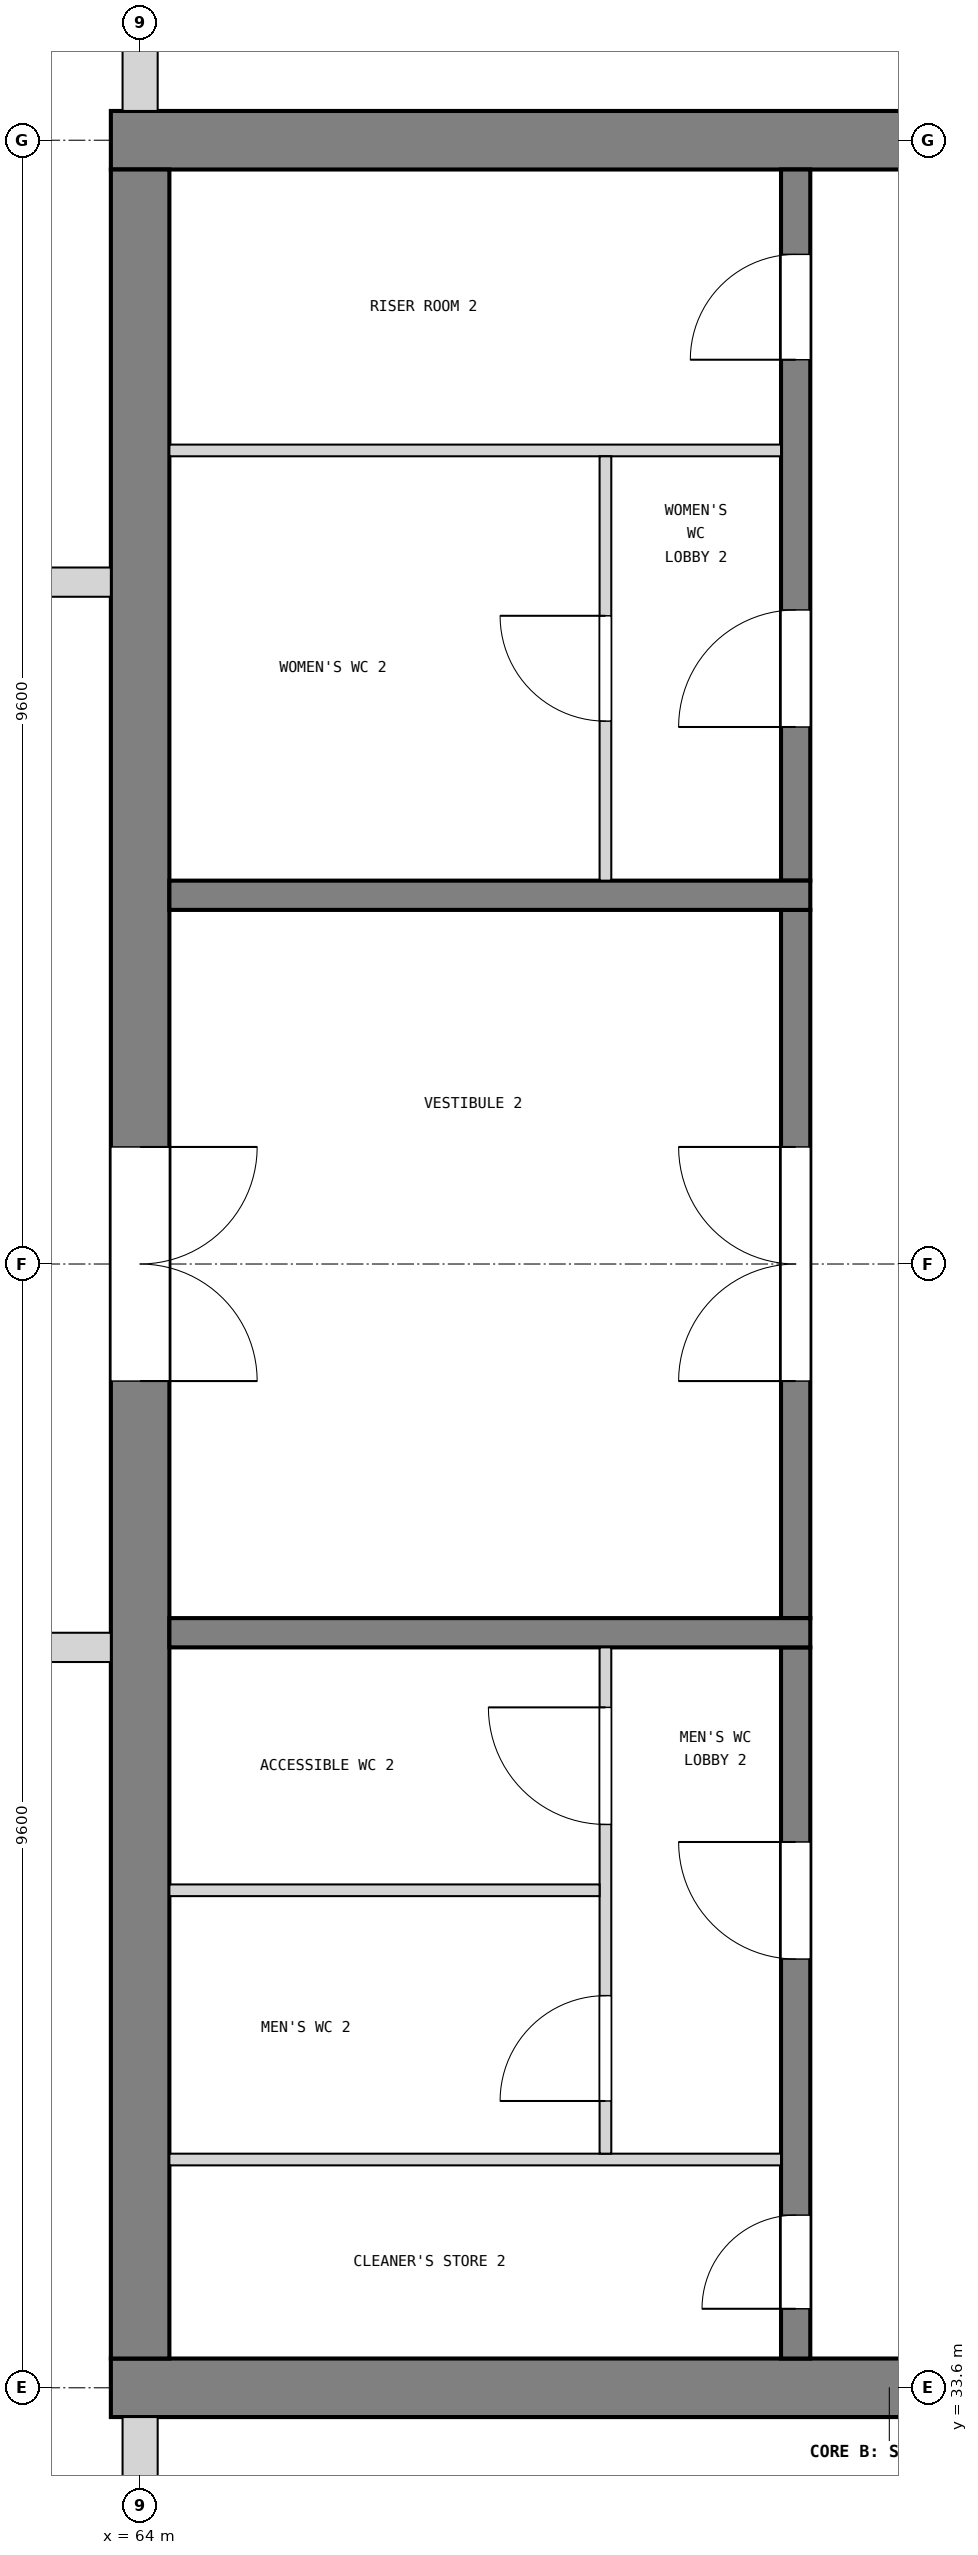
"""IFC4 building model, lengths in metres.
Left out: names, types, materials, properties, quantities, classifications, styles, units other than length and angle.
Written with IfcOpenShell. Run it as: python <this file> out.ifc"""

import sys

from ifc_helpers import new_model, si_unit, direction, frame, frame_2d, origin, place, context, subcontext, project, spatial, rectangle, extrude, element, fill, save


model = new_model("IFC4")
c1 = context("Model", 3, precision=1e-05, world=origin(), true_north=direction((0.0, 1.0)))
c2 = subcontext(c1, "Body", "Model", "MODEL_VIEW")
j1 = project(units=[si_unit("LENGTHUNIT", "METRE"), si_unit("PLANEANGLEUNIT", "RADIAN")], contexts=[c1])
p1 = place(None, origin())
s1 = spatial("IfcSite", under=j1, at=p1, CompositionType="ELEMENT")
p2 = place(p1, origin())
s2 = spatial("IfcBuilding", under=s1, at=p2, CompositionType="ELEMENT")
p3 = place(p2, frame((0.0, 0.0, 64.2)))
s3 = spatial("IfcBuildingStorey", under=s2, at=p3, CompositionType="ELEMENT", Elevation=64.2)
p4 = place(p3, frame((63.75, 52.8, 0.0), z_axis=(0.0, 0.0, 1.0), x_axis=(1.0, 0.0, 0.0)))
e1 = element("IfcWall", 1, at=p4, inside=s3, PredefinedType="SHEAR", context=c2, shape_type="SweptSolid", body=[
    extrude(rectangle(XDim=13.3, YDim=0.5, at=frame_2d((6.65, 0.0))), origin(), (0.0, 0.0, 1.0), 5.1),
])
p5 = place(p4, frame((11.05, 0.0, 1.0)))
e2 = element("IfcOpeningElement", 2, at=p5, cuts=e1, PredefinedType="OPENING", context=c2, shape_type="SweptSolid", body=[
    extrude(rectangle(XDim=0.4, YDim=2.0, at=frame_2d((0.2, 1.0))), frame((0.0, 0.26, 0.0), z_axis=(0.0, -1.0, 0.0), x_axis=(1.0, 0.0, 0.0)), (0.0, 0.0, 1.0), 0.52),
])
p6 = place(p3, frame((63.75, 33.6, 0.0), z_axis=(0.0, 0.0, 1.0), x_axis=(1.0, 0.0, 0.0)))
e3 = element("IfcWall", 3, at=p6, inside=s3, PredefinedType="SHEAR", context=c2, shape_type="SweptSolid", body=[
    extrude(rectangle(XDim=13.3, YDim=0.5, at=frame_2d((6.65, 0.0))), origin(), (0.0, 0.0, 1.0), 5.1),
])
p7 = place(p6, frame((11.05, 0.0, 1.0)))
e4 = element("IfcOpeningElement", 4, at=p7, cuts=e3, PredefinedType="OPENING", context=c2, shape_type="SweptSolid", body=[
    extrude(rectangle(XDim=0.4, YDim=2.0, at=frame_2d((0.2, 1.0))), frame((0.0, 0.26, 0.0), z_axis=(0.0, -1.0, 0.0), x_axis=(1.0, 0.0, 0.0)), (0.0, 0.0, 1.0), 0.52),
])
p8 = place(p3, frame((64.0, 33.85, 0.0), z_axis=(0.0, 0.0, 1.0), x_axis=(0.0, 1.0, 0.0)))
e5 = element("IfcWall", 5, at=p8, inside=s3, PredefinedType="SHEAR", context=c2, shape_type="SweptSolid", body=[
    extrude(rectangle(XDim=18.7, YDim=0.5, at=frame_2d((9.35, 0.0))), origin(), (0.0, 0.0, 1.0), 5.1),
])
p9 = place(p8, frame((8.35, 0.0, 0.0)))
e6 = element("IfcOpeningElement", 6, at=p9, cuts=e5, PredefinedType="OPENING", context=c2, shape_type="SweptSolid", body=[
    extrude(rectangle(XDim=2.0, YDim=2.1, at=frame_2d((1.0, 1.05))), frame((0.0, 0.26, 0.0), z_axis=(0.0, -1.0, 0.0), x_axis=(1.0, 0.0, 0.0)), (0.0, 0.0, 1.0), 0.52),
])
p10 = place(p3, frame((64.0, 31.0, 0.0), z_axis=(0.0, 0.0, 1.0), x_axis=(0.0, 1.0, 0.0)))
e7 = element("IfcWall", 7, at=p10, inside=s3, PredefinedType="SOLIDWALL", context=c2, shape_type="SweptSolid", body=[
    extrude(rectangle(XDim=2.35, YDim=0.3, at=frame_2d((1.175, 0.0))), origin(), (0.0, 0.0, 1.0), 4.3),
])
p11 = place(p3, frame((64.0, 53.05, 0.0), z_axis=(0.0, 0.0, 1.0), x_axis=(0.0, 1.0, 0.0)))
e8 = element("IfcWall", 8, at=p11, inside=s3, PredefinedType="SOLIDWALL", context=c2, shape_type="SweptSolid", body=[
    extrude(rectangle(XDim=2.35, YDim=0.3, at=frame_2d((1.175, 0.0))), origin(), (0.0, 0.0, 1.0), 4.3),
])
p12 = place(p3, frame((69.6, 33.85, 0.0), z_axis=(0.0, 0.0, 1.0), x_axis=(0.0, 1.0, 0.0)))
e9 = element("IfcWall", 9, at=p12, inside=s3, PredefinedType="SOLIDWALL", context=c2, shape_type="SweptSolid", body=[
    extrude(rectangle(XDim=6.075, YDim=0.25, at=frame_2d((3.038, 0.0))), origin(), (0.0, 0.0, 1.0), 5.1),
])
p13 = place(p12, frame((0.425, 0.0, 0.0)))
e10 = element("IfcOpeningElement", 10, at=p13, cuts=e9, PredefinedType="OPENING", context=c2, shape_type="SweptSolid", body=[
    extrude(rectangle(XDim=0.8, YDim=2.1, at=frame_2d((0.4, 1.05))), frame((0.0, 0.135, 0.0), z_axis=(0.0, -1.0, 0.0), x_axis=(1.0, 0.0, 0.0)), (0.0, 0.0, 1.0), 0.27),
])
p14 = place(p12, frame((3.413, 0.0, 0.0)))
e11 = element("IfcOpeningElement", 11, at=p14, cuts=e9, PredefinedType="OPENING", context=c2, shape_type="SweptSolid", body=[
    extrude(rectangle(XDim=1.0, YDim=2.1, at=frame_2d((0.5, 1.05))), frame((0.0, 0.135, 0.0), z_axis=(0.0, -1.0, 0.0), x_axis=(1.0, 0.0, 0.0)), (0.0, 0.0, 1.0), 0.27),
])
p15 = place(p3, frame((69.6, 40.175, 0.0), z_axis=(0.0, 0.0, 1.0), x_axis=(0.0, 1.0, 0.0)))
e12 = element("IfcWall", 12, at=p15, inside=s3, PredefinedType="SOLIDWALL", context=c2, shape_type="SweptSolid", body=[
    extrude(rectangle(XDim=6.05, YDim=0.25, at=frame_2d((3.025, 0.0))), origin(), (0.0, 0.0, 1.0), 5.1),
])
p16 = place(p15, frame((2.025, 0.0, 0.0)))
e13 = element("IfcOpeningElement", 13, at=p16, cuts=e12, PredefinedType="OPENING", context=c2, shape_type="SweptSolid", body=[
    extrude(rectangle(XDim=2.0, YDim=2.1, at=frame_2d((1.0, 1.05))), frame((0.0, 0.135, 0.0), z_axis=(0.0, -1.0, 0.0), x_axis=(1.0, 0.0, 0.0)), (0.0, 0.0, 1.0), 0.27),
])
p17 = place(p3, frame((69.6, 46.475, 0.0), z_axis=(0.0, 0.0, 1.0), x_axis=(0.0, 1.0, 0.0)))
e14 = element("IfcWall", 14, at=p17, inside=s3, PredefinedType="SOLIDWALL", context=c2, shape_type="SweptSolid", body=[
    extrude(rectangle(XDim=6.075, YDim=0.25, at=frame_2d((3.038, 0.0))), origin(), (0.0, 0.0, 1.0), 5.1),
])
p18 = place(p17, frame((1.312, 0.0, 0.0)))
e15 = element("IfcOpeningElement", 15, at=p18, cuts=e14, PredefinedType="OPENING", context=c2, shape_type="SweptSolid", body=[
    extrude(rectangle(XDim=1.0, YDim=2.1, at=frame_2d((0.5, 1.05))), frame((0.0, 0.135, 0.0), z_axis=(0.0, -1.0, 0.0), x_axis=(1.0, 0.0, 0.0)), (0.0, 0.0, 1.0), 0.27),
])
p19 = place(p17, frame((4.45, 0.0, 0.0)))
e16 = element("IfcOpeningElement", 16, at=p19, cuts=e14, PredefinedType="OPENING", context=c2, shape_type="SweptSolid", body=[
    extrude(rectangle(XDim=0.9, YDim=2.1, at=frame_2d((0.45, 1.05))), frame((0.0, 0.135, 0.0), z_axis=(0.0, -1.0, 0.0), x_axis=(1.0, 0.0, 0.0)), (0.0, 0.0, 1.0), 0.27),
])
for number, where, z_axis, x_axis in (
    (17, (69.725, 40.05, 0.0), (0.0, 0.0, 1.0), (-1.0, 0.0, 0.0)),
    (18, (69.725, 46.35, 0.0), (0.0, 0.0, 1.0), (-1.0, 0.0, 0.0)),
):
    element("IfcWall", number, at=place(p3, frame(where, z_axis=z_axis, x_axis=x_axis)), inside=s3, PredefinedType="SOLIDWALL", context=c2, shape_type="SweptSolid", body=[
        extrude(rectangle(XDim=5.475, YDim=0.25, at=frame_2d((2.738, 0.0))), origin(), (0.0, 0.0, 1.0), 5.1),
    ])
p20 = place(p3, frame((69.475, 35.55, 0.0), z_axis=(0.0, 0.0, 1.0), x_axis=(-1.0, 0.0, 0.0)))
e19 = element("IfcWall", 19, at=p20, inside=s3, PredefinedType="PARTITIONING", context=c2, shape_type="SweptSolid", body=[
    extrude(rectangle(XDim=5.225, YDim=0.1, at=frame_2d((2.613, 0.0))), origin(), (0.0, 0.0, 1.0), 5.1),
])
p21 = place(p3, frame((67.975, 35.6, 0.0), z_axis=(0.0, 0.0, 1.0), x_axis=(0.0, 1.0, 0.0)))
e20 = element("IfcWall", 20, at=p21, inside=s3, PredefinedType="PARTITIONING", context=c2, shape_type="SweptSolid", body=[
    extrude(rectangle(XDim=4.325, YDim=0.1, at=frame_2d((2.163, 0.0))), origin(), (0.0, 0.0, 1.0), 5.1),
])
p22 = place(p21, frame((0.45, 0.0, 0.0)))
e21 = element("IfcOpeningElement", 21, at=p22, cuts=e20, PredefinedType="OPENING", context=c2, shape_type="SweptSolid", body=[
    extrude(rectangle(XDim=0.9, YDim=2.1, at=frame_2d((0.45, 1.05))), frame((0.0, 0.06, 0.0), z_axis=(0.0, -1.0, 0.0), x_axis=(1.0, 0.0, 0.0)), (0.0, 0.0, 1.0), 0.12),
])
p23 = place(p21, frame((2.812, 0.0, 0.0)))
e22 = element("IfcOpeningElement", 22, at=p23, cuts=e20, PredefinedType="OPENING", context=c2, shape_type="SweptSolid", body=[
    extrude(rectangle(XDim=1.0, YDim=2.1, at=frame_2d((0.5, 1.05))), frame((0.0, 0.06, 0.0), z_axis=(0.0, -1.0, 0.0), x_axis=(1.0, 0.0, 0.0)), (0.0, 0.0, 1.0), 0.12),
])
p24 = place(p3, frame((67.925, 37.85, 0.0), z_axis=(0.0, 0.0, 1.0), x_axis=(-1.0, 0.0, 0.0)))
e23 = element("IfcWall", 23, at=p24, inside=s3, PredefinedType="PARTITIONING", context=c2, shape_type="SweptSolid", body=[
    extrude(rectangle(XDim=3.675, YDim=0.1, at=frame_2d((1.837, 0.0))), origin(), (0.0, 0.0, 1.0), 5.1),
])
p25 = place(p3, frame((69.475, 50.15, 0.0), z_axis=(0.0, 0.0, 1.0), x_axis=(-1.0, 0.0, 0.0)))
e24 = element("IfcWall", 24, at=p25, inside=s3, PredefinedType="PARTITIONING", context=c2, shape_type="SweptSolid", body=[
    extrude(rectangle(XDim=5.225, YDim=0.1, at=frame_2d((2.613, 0.0))), origin(), (0.0, 0.0, 1.0), 5.1),
])
p26 = place(p3, frame((67.975, 46.475, 0.0), z_axis=(0.0, 0.0, 1.0), x_axis=(0.0, 1.0, 0.0)))
e25 = element("IfcWall", 25, at=p26, inside=s3, PredefinedType="PARTITIONING", context=c2, shape_type="SweptSolid", body=[
    extrude(rectangle(XDim=3.625, YDim=0.1, at=frame_2d((1.812, 0.0))), origin(), (0.0, 0.0, 1.0), 5.1),
])
p27 = place(p26, frame((1.363, 0.0, 0.0)))
e26 = element("IfcOpeningElement", 26, at=p27, cuts=e25, PredefinedType="OPENING", context=c2, shape_type="SweptSolid", body=[
    extrude(rectangle(XDim=0.9, YDim=2.1, at=frame_2d((0.45, 1.05))), frame((0.0, 0.06, 0.0), z_axis=(0.0, -1.0, 0.0), x_axis=(1.0, 0.0, 0.0)), (0.0, 0.0, 1.0), 0.12),
])
p28 = place(p3, frame((55.91, 49.025, 0.0), z_axis=(0.0, 0.0, 1.0), x_axis=(1.0, 0.0, 0.0)))
e27 = element("IfcWall", 27, at=p28, inside=s3, PredefinedType="PARTITIONING", context=c2, shape_type="SweptSolid", body=[
    extrude(rectangle(XDim=7.84, YDim=0.25, at=frame_2d((3.92, 0.0))), origin(), (0.0, 0.0, 1.0), 5.1),
])
p29 = place(p28, frame((3.39, 0.0, 0.0)))
e28 = element("IfcOpeningElement", 28, at=p29, cuts=e27, PredefinedType="OPENING", context=c2, shape_type="SweptSolid", body=[
    extrude(rectangle(XDim=1.2, YDim=2.1, at=frame_2d((0.6, 1.05))), frame((0.0, 0.135, 0.0), z_axis=(0.0, -1.0, 0.0), x_axis=(1.0, 0.0, 0.0)), (0.0, 0.0, 1.0), 0.27),
])
p30 = place(p3, frame((57.78, 39.925, 0.0), z_axis=(0.0, 0.0, 1.0), x_axis=(1.0, 0.0, 0.0)))
e29 = element("IfcWall", 29, at=p30, inside=s3, PredefinedType="PARTITIONING", context=c2, shape_type="SweptSolid", body=[
    extrude(rectangle(XDim=5.97, YDim=0.25, at=frame_2d((2.985, 0.0))), origin(), (0.0, 0.0, 1.0), 5.1),
])
p31 = place(p30, frame((2.47, 0.0, 0.0)))
e30 = element("IfcOpeningElement", 30, at=p31, cuts=e29, PredefinedType="OPENING", context=c2, shape_type="SweptSolid", body=[
    extrude(rectangle(XDim=1.2, YDim=2.1, at=frame_2d((0.6, 1.05))), frame((0.0, 0.135, 0.0), z_axis=(0.0, -1.0, 0.0), x_axis=(1.0, 0.0, 0.0)), (0.0, 0.0, 1.0), 0.27),
])
p32 = place(p16, origin())
e31 = element("IfcDoor", 31, at=p32, inside=s3, OperationType="DOUBLE_DOOR_SINGLE_SWING", PredefinedType="DOOR", context=c2, shape_type="SweptSolid", body=[
    extrude(rectangle(XDim=2.0, YDim=2.1, at=frame_2d((1.0, 1.05))), frame((0.0, 0.025, 0.0), z_axis=(0.0, -1.0, 0.0), x_axis=(1.0, 0.0, 0.0)), (0.0, 0.0, 1.0), 0.05),
])
fill(e13, e31)
p33 = place(p9, frame((2.0, 0.0, 0.0), z_axis=(0.0, 0.0, 1.0), x_axis=(-1.0, 0.0, 0.0)))
e32 = element("IfcDoor", 32, at=p33, inside=s3, OperationType="DOUBLE_DOOR_SINGLE_SWING", PredefinedType="DOOR", context=c2, shape_type="SweptSolid", body=[
    extrude(rectangle(XDim=2.0, YDim=2.1, at=frame_2d((1.0, 1.05))), frame((0.0, 0.025, 0.0), z_axis=(0.0, -1.0, 0.0), x_axis=(1.0, 0.0, 0.0)), (0.0, 0.0, 1.0), 0.05),
])
fill(e6, e32)
p34 = place(p13, origin())
e33 = element("IfcDoor", 33, at=p34, inside=s3, OperationType="SINGLE_SWING_LEFT", PredefinedType="DOOR", context=c2, shape_type="SweptSolid", body=[
    extrude(rectangle(XDim=0.8, YDim=2.1, at=frame_2d((0.4, 1.05))), frame((0.0, 0.025, 0.0), z_axis=(0.0, -1.0, 0.0), x_axis=(1.0, 0.0, 0.0)), (0.0, 0.0, 1.0), 0.05),
])
fill(e10, e33)
p35 = place(p14, origin())
e34 = element("IfcDoor", 34, at=p35, inside=s3, OperationType="SINGLE_SWING_RIGHT", PredefinedType="DOOR", context=c2, shape_type="SweptSolid", body=[
    extrude(rectangle(XDim=1.0, YDim=2.1, at=frame_2d((0.5, 1.05))), frame((0.0, 0.025, 0.0), z_axis=(0.0, -1.0, 0.0), x_axis=(1.0, 0.0, 0.0)), (0.0, 0.0, 1.0), 0.05),
])
fill(e11, e34)
p36 = place(p22, origin())
e35 = element("IfcDoor", 35, at=p36, inside=s3, OperationType="SINGLE_SWING_LEFT", PredefinedType="DOOR", context=c2, shape_type="SweptSolid", body=[
    extrude(rectangle(XDim=0.9, YDim=2.1, at=frame_2d((0.45, 1.05))), frame((0.0, 0.025, 0.0), z_axis=(0.0, -1.0, 0.0), x_axis=(1.0, 0.0, 0.0)), (0.0, 0.0, 1.0), 0.05),
])
fill(e21, e35)
p37 = place(p23, origin())
e36 = element("IfcDoor", 36, at=p37, inside=s3, OperationType="SINGLE_SWING_RIGHT", PredefinedType="DOOR", context=c2, shape_type="SweptSolid", body=[
    extrude(rectangle(XDim=1.0, YDim=2.1, at=frame_2d((0.5, 1.05))), frame((0.0, 0.025, 0.0), z_axis=(0.0, -1.0, 0.0), x_axis=(1.0, 0.0, 0.0)), (0.0, 0.0, 1.0), 0.05),
])
fill(e22, e36)
p38 = place(p18, origin())
e37 = element("IfcDoor", 37, at=p38, inside=s3, OperationType="SINGLE_SWING_LEFT", PredefinedType="DOOR", context=c2, shape_type="SweptSolid", body=[
    extrude(rectangle(XDim=1.0, YDim=2.1, at=frame_2d((0.5, 1.05))), frame((0.0, 0.025, 0.0), z_axis=(0.0, -1.0, 0.0), x_axis=(1.0, 0.0, 0.0)), (0.0, 0.0, 1.0), 0.05),
])
fill(e15, e37)
p39 = place(p27, origin())
e38 = element("IfcDoor", 38, at=p39, inside=s3, OperationType="SINGLE_SWING_RIGHT", PredefinedType="DOOR", context=c2, shape_type="SweptSolid", body=[
    extrude(rectangle(XDim=0.9, YDim=2.1, at=frame_2d((0.45, 1.05))), frame((0.0, 0.025, 0.0), z_axis=(0.0, -1.0, 0.0), x_axis=(1.0, 0.0, 0.0)), (0.0, 0.0, 1.0), 0.05),
])
fill(e26, e38)
p40 = place(p19, origin())
e39 = element("IfcDoor", 39, at=p40, inside=s3, OperationType="SINGLE_SWING_LEFT", PredefinedType="DOOR", context=c2, shape_type="SweptSolid", body=[
    extrude(rectangle(XDim=0.9, YDim=2.1, at=frame_2d((0.45, 1.05))), frame((0.0, 0.025, 0.0), z_axis=(0.0, -1.0, 0.0), x_axis=(1.0, 0.0, 0.0)), (0.0, 0.0, 1.0), 0.05),
])
fill(e16, e39)
save(model, sys.argv[1])
